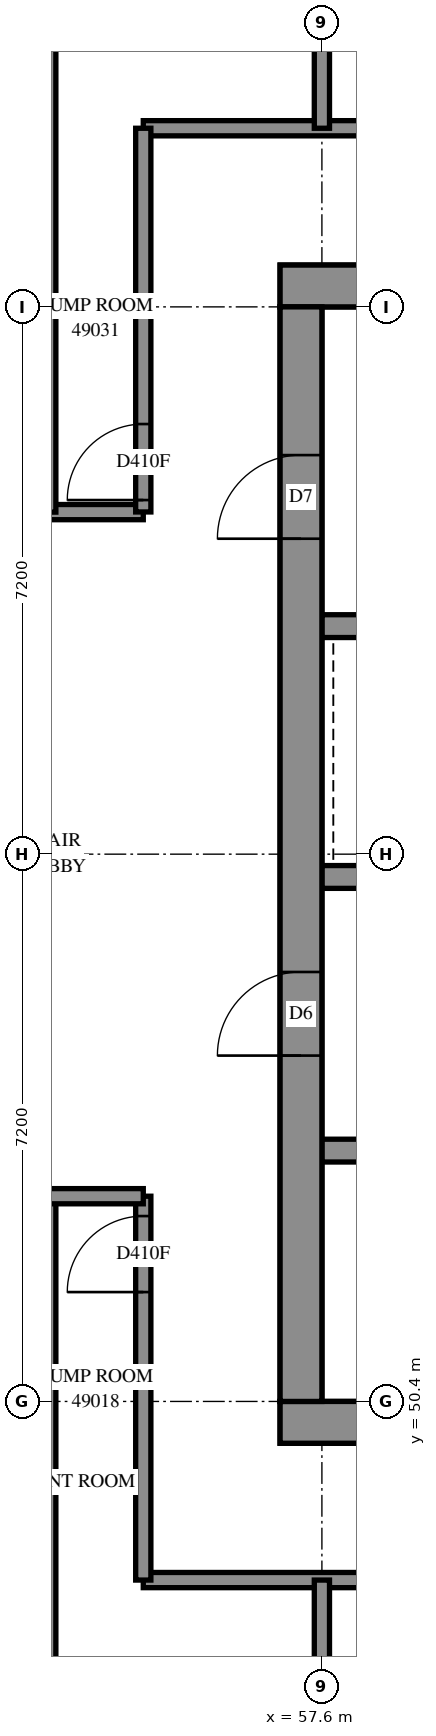
"""IFC4 building model, lengths in metres.
Left out: names, types, materials, properties, quantities, classifications, styles, units other than length and angle.
Written with IfcOpenShell. Run it as: python <this file> out.ifc"""

import sys

from ifc_helpers import new_model, si_unit, direction, frame, frame_2d, origin, place, context, subcontext, project, spatial, rectangle, extrude, element, fill, save


model = new_model("IFC4")
c1 = context("Model", 3, precision=1e-05, world=origin(), true_north=direction((0.0, 1.0)))
c2 = subcontext(c1, "Body", "Model", "MODEL_VIEW")
j1 = project(units=[si_unit("LENGTHUNIT", "METRE"), si_unit("PLANEANGLEUNIT", "RADIAN")], contexts=[c1])
p1 = place(None, origin())
s1 = spatial("IfcSite", under=j1, at=p1, CompositionType="ELEMENT")
p2 = place(p1, origin())
s2 = spatial("IfcBuilding", under=s1, at=p2, CompositionType="ELEMENT")
p3 = place(p2, frame((0.0, 0.0, 180.4)))
s3 = spatial("IfcBuildingStorey", under=s2, at=p3, CompositionType="ELEMENT", Elevation=180.4)
p4 = place(p3, frame((57.05, 50.125, -0.3), z_axis=(0.0, 0.0, 1.0), x_axis=(1.0, 0.0, 0.0)))
e1 = element("IfcWall", 1, at=p4, inside=s3, PredefinedType="SHEAR", context=c2, shape_type="SweptSolid", body=[
    extrude(rectangle(XDim=15.5, YDim=0.55, at=frame_2d((7.75, 0.0))), origin(), (0.0, 0.0, 1.0), 4.3),
])
p5 = place(p3, frame((57.05, 65.075, -0.3), z_axis=(0.0, 0.0, 1.0), x_axis=(1.0, 0.0, 0.0)))
e2 = element("IfcWall", 2, at=p5, inside=s3, PredefinedType="SHEAR", context=c2, shape_type="SweptSolid", body=[
    extrude(rectangle(XDim=15.5, YDim=0.55, at=frame_2d((7.75, 0.0))), origin(), (0.0, 0.0, 1.0), 4.3),
])
p6 = place(p5, frame((10.55, 0.0, 0.3)))
e3 = element("IfcOpeningElement", 3, at=p6, cuts=e2, PredefinedType="OPENING", context=c2, shape_type="SweptSolid", body=[
    extrude(rectangle(XDim=0.8, YDim=2.1, at=frame_2d((0.4, 1.05))), frame((0.0, 0.285, 0.0), z_axis=(0.0, -1.0, 0.0), x_axis=(1.0, 0.0, 0.0)), (0.0, 0.0, 1.0), 0.57),
])
p7 = place(p3, frame((57.325, 50.4, -0.3), z_axis=(0.0, 0.0, 1.0), x_axis=(0.0, 1.0, 0.0)))
e4 = element("IfcWall", 4, at=p7, inside=s3, PredefinedType="SHEAR", context=c2, shape_type="SweptSolid", body=[
    extrude(rectangle(XDim=14.4, YDim=0.55, at=frame_2d((7.2, 0.0))), origin(), (0.0, 0.0, 1.0), 4.3),
])
p8 = place(p7, frame((4.55, 0.0, 0.3)))
e5 = element("IfcOpeningElement", 5, at=p8, cuts=e4, PredefinedType="OPENING", context=c2, shape_type="SweptSolid", body=[
    extrude(rectangle(XDim=1.1, YDim=2.1, at=frame_2d((0.55, 1.05))), frame((0.0, 0.285, 0.0), z_axis=(0.0, -1.0, 0.0), x_axis=(1.0, 0.0, 0.0)), (0.0, 0.0, 1.0), 0.57),
])
p9 = place(p7, frame((11.35, 0.0, 0.3)))
e6 = element("IfcOpeningElement", 6, at=p9, cuts=e4, PredefinedType="OPENING", context=c2, shape_type="SweptSolid", body=[
    extrude(rectangle(XDim=1.1, YDim=2.1, at=frame_2d((0.55, 1.05))), frame((0.0, 0.285, 0.0), z_axis=(0.0, -1.0, 0.0), x_axis=(1.0, 0.0, 0.0)), (0.0, 0.0, 1.0), 0.57),
])
p10 = place(p3, frame((57.6, 53.7, 0.0), z_axis=(0.0, 0.0, 1.0), x_axis=(1.0, 0.0, 0.0)))
e7 = element("IfcWall", 7, at=p10, inside=s3, PredefinedType="SOLIDWALL", context=c2, shape_type="SweptSolid", body=[
    extrude(rectangle(XDim=14.4, YDim=0.3, at=frame_2d((7.2, 0.0))), origin(), (0.0, 0.0, 1.0), 4.7),
])
p11 = place(p10, frame((1.35, 0.0, 0.0)))
e8 = element("IfcOpeningElement", 8, at=p11, cuts=e7, PredefinedType="OPENING", context=c2, shape_type="SweptSolid", body=[
    extrude(rectangle(XDim=0.9, YDim=2.1, at=frame_2d((0.45, 1.05))), frame((0.0, 0.16, 0.0), z_axis=(0.0, -1.0, 0.0), x_axis=(1.0, 0.0, 0.0)), (0.0, 0.0, 1.0), 0.32),
])
p12 = place(p10, frame((4.95, 0.0, 0.0)))
e9 = element("IfcOpeningElement", 9, at=p12, cuts=e7, PredefinedType="OPENING", context=c2, shape_type="SweptSolid", body=[
    extrude(rectangle(XDim=0.9, YDim=2.1, at=frame_2d((0.45, 1.05))), frame((0.0, 0.16, 0.0), z_axis=(0.0, -1.0, 0.0), x_axis=(1.0, 0.0, 0.0)), (0.0, 0.0, 1.0), 0.32),
])
p13 = place(p10, frame((8.55, 0.0, 0.0)))
e10 = element("IfcOpeningElement", 10, at=p13, cuts=e7, PredefinedType="OPENING", context=c2, shape_type="SweptSolid", body=[
    extrude(rectangle(XDim=0.9, YDim=2.1, at=frame_2d((0.45, 1.05))), frame((0.0, 0.16, 0.0), z_axis=(0.0, -1.0, 0.0), x_axis=(1.0, 0.0, 0.0)), (0.0, 0.0, 1.0), 0.32),
])
p14 = place(p10, frame((12.05, 0.0, 0.0)))
e11 = element("IfcOpeningElement", 11, at=p14, cuts=e7, PredefinedType="OPENING", context=c2, shape_type="SweptSolid", body=[
    extrude(rectangle(XDim=1.1, YDim=2.1, at=frame_2d((0.55, 1.05))), frame((0.0, 0.16, 0.0), z_axis=(0.0, -1.0, 0.0), x_axis=(1.0, 0.0, 0.0)), (0.0, 0.0, 1.0), 0.32),
])
p15 = place(p3, frame((57.6, 57.3, 0.0), z_axis=(0.0, 0.0, 1.0), x_axis=(1.0, 0.0, 0.0)))
e12 = element("IfcWall", 12, at=p15, inside=s3, PredefinedType="SOLIDWALL", context=c2, shape_type="SweptSolid", body=[
    extrude(rectangle(XDim=14.4, YDim=0.3, at=frame_2d((7.2, 0.0))), origin(), (0.0, 0.0, 1.0), 4.7),
])
p16 = place(p15, frame((1.25, 0.0, 0.0)))
e13 = element("IfcOpeningElement", 13, at=p16, cuts=e12, PredefinedType="OPENING", context=c2, shape_type="SweptSolid", body=[
    extrude(rectangle(XDim=1.1, YDim=2.1, at=frame_2d((0.55, 1.05))), frame((0.0, 0.16, 0.0), z_axis=(0.0, -1.0, 0.0), x_axis=(1.0, 0.0, 0.0)), (0.0, 0.0, 1.0), 0.32),
])
p17 = place(p15, frame((4.85, 0.0, 0.0)))
e14 = element("IfcOpeningElement", 14, at=p17, cuts=e12, PredefinedType="OPENING", context=c2, shape_type="SweptSolid", body=[
    extrude(rectangle(XDim=1.1, YDim=2.1, at=frame_2d((0.55, 1.05))), frame((0.0, 0.16, 0.0), z_axis=(0.0, -1.0, 0.0), x_axis=(1.0, 0.0, 0.0)), (0.0, 0.0, 1.0), 0.32),
])
p18 = place(p15, frame((8.45, 0.0, 0.0)))
e15 = element("IfcOpeningElement", 15, at=p18, cuts=e12, PredefinedType="OPENING", context=c2, shape_type="SweptSolid", body=[
    extrude(rectangle(XDim=1.1, YDim=2.1, at=frame_2d((0.55, 1.05))), frame((0.0, 0.16, 0.0), z_axis=(0.0, -1.0, 0.0), x_axis=(1.0, 0.0, 0.0)), (0.0, 0.0, 1.0), 0.32),
])
p19 = place(p15, frame((12.05, 0.0, 0.0)))
e16 = element("IfcOpeningElement", 16, at=p19, cuts=e12, PredefinedType="OPENING", context=c2, shape_type="SweptSolid", body=[
    extrude(rectangle(XDim=1.1, YDim=2.1, at=frame_2d((0.55, 1.05))), frame((0.0, 0.16, 0.0), z_axis=(0.0, -1.0, 0.0), x_axis=(1.0, 0.0, 0.0)), (0.0, 0.0, 1.0), 0.32),
])
p20 = place(p3, frame((57.6, 60.6, 0.0), z_axis=(0.0, 0.0, 1.0), x_axis=(1.0, 0.0, 0.0)))
e17 = element("IfcWall", 17, at=p20, inside=s3, PredefinedType="SOLIDWALL", context=c2, shape_type="SweptSolid", body=[
    extrude(rectangle(XDim=7.2, YDim=0.3, at=frame_2d((3.6, 0.0))), origin(), (0.0, 0.0, 1.0), 4.7),
])
p21 = place(p3, frame((55.25, 48.05, 0.0), z_axis=(0.0, 0.0, 1.0), x_axis=(1.0, 0.0, 0.0)))
e18 = element("IfcWall", 18, at=p21, inside=s3, PredefinedType="PARTITIONING", context=c2, shape_type="SweptSolid", body=[
    extrude(rectangle(XDim=19.12, YDim=0.2, at=frame_2d((9.56, 0.0))), origin(), (0.0, 0.0, 1.0), 4.7),
])
p22 = place(p21, frame((4.383, 0.0, 0.0)))
e19 = element("IfcOpeningElement", 19, at=p22, cuts=e18, PredefinedType="OPENING", context=c2, shape_type="SweptSolid", body=[
    extrude(rectangle(XDim=1.0, YDim=2.1, at=frame_2d((0.5, 1.05))), frame((0.0, 0.11, 0.0), z_axis=(0.0, -1.0, 0.0), x_axis=(1.0, 0.0, 0.0)), (0.0, 0.0, 1.0), 0.22),
])
p23 = place(p21, frame((6.457, 0.0, 0.0)))
e20 = element("IfcOpeningElement", 20, at=p23, cuts=e18, PredefinedType="OPENING", context=c2, shape_type="SweptSolid", body=[
    extrude(rectangle(XDim=1.0, YDim=2.1, at=frame_2d((0.5, 1.05))), frame((0.0, 0.11, 0.0), z_axis=(0.0, -1.0, 0.0), x_axis=(1.0, 0.0, 0.0)), (0.0, 0.0, 1.0), 0.22),
])
p24 = place(p21, frame((11.582, 0.0, 0.0)))
e21 = element("IfcOpeningElement", 21, at=p24, cuts=e18, PredefinedType="OPENING", context=c2, shape_type="SweptSolid", body=[
    extrude(rectangle(XDim=1.0, YDim=2.1, at=frame_2d((0.5, 1.05))), frame((0.0, 0.11, 0.0), z_axis=(0.0, -1.0, 0.0), x_axis=(1.0, 0.0, 0.0)), (0.0, 0.0, 1.0), 0.22),
])
p25 = place(p21, frame((13.658, 0.0, 0.0)))
e22 = element("IfcOpeningElement", 22, at=p25, cuts=e18, PredefinedType="OPENING", context=c2, shape_type="SweptSolid", body=[
    extrude(rectangle(XDim=1.0, YDim=2.1, at=frame_2d((0.5, 1.05))), frame((0.0, 0.11, 0.0), z_axis=(0.0, -1.0, 0.0), x_axis=(1.0, 0.0, 0.0)), (0.0, 0.0, 1.0), 0.22),
])
p26 = place(p3, frame((55.25, 67.15, 0.0), z_axis=(0.0, 0.0, 1.0), x_axis=(1.0, 0.0, 0.0)))
e23 = element("IfcWall", 23, at=p26, inside=s3, PredefinedType="PARTITIONING", context=c2, shape_type="SweptSolid", body=[
    extrude(rectangle(XDim=19.1, YDim=0.2, at=frame_2d((9.55, 0.0))), origin(), (0.0, 0.0, 1.0), 4.7),
])
p27 = place(p26, frame((4.442, 0.0, 0.0)))
e24 = element("IfcOpeningElement", 24, at=p27, cuts=e23, PredefinedType="OPENING", context=c2, shape_type="SweptSolid", body=[
    extrude(rectangle(XDim=1.0, YDim=2.1, at=frame_2d((0.5, 1.05))), frame((0.0, 0.11, 0.0), z_axis=(0.0, -1.0, 0.0), x_axis=(1.0, 0.0, 0.0)), (0.0, 0.0, 1.0), 0.22),
])
p28 = place(p26, frame((6.518, 0.0, 0.0)))
e25 = element("IfcOpeningElement", 25, at=p28, cuts=e23, PredefinedType="OPENING", context=c2, shape_type="SweptSolid", body=[
    extrude(rectangle(XDim=1.0, YDim=2.1, at=frame_2d((0.5, 1.05))), frame((0.0, 0.11, 0.0), z_axis=(0.0, -1.0, 0.0), x_axis=(1.0, 0.0, 0.0)), (0.0, 0.0, 1.0), 0.22),
])
p29 = place(p26, frame((11.643, 0.0, 0.0)))
e26 = element("IfcOpeningElement", 26, at=p29, cuts=e23, PredefinedType="OPENING", context=c2, shape_type="SweptSolid", body=[
    extrude(rectangle(XDim=1.0, YDim=2.1, at=frame_2d((0.5, 1.05))), frame((0.0, 0.11, 0.0), z_axis=(0.0, -1.0, 0.0), x_axis=(1.0, 0.0, 0.0)), (0.0, 0.0, 1.0), 0.22),
])
p30 = place(p26, frame((13.717, 0.0, 0.0)))
e27 = element("IfcOpeningElement", 27, at=p30, cuts=e23, PredefinedType="OPENING", context=c2, shape_type="SweptSolid", body=[
    extrude(rectangle(XDim=1.0, YDim=2.1, at=frame_2d((0.5, 1.05))), frame((0.0, 0.11, 0.0), z_axis=(0.0, -1.0, 0.0), x_axis=(1.0, 0.0, 0.0)), (0.0, 0.0, 1.0), 0.22),
])
p31 = place(p3, frame((40.502, 62.1, 0.0), z_axis=(0.0, 0.0, 1.0), x_axis=(1.0, 0.0, 0.0)))
e28 = element("IfcWall", 28, at=p31, inside=s3, PredefinedType="PARTITIONING", context=c2, shape_type="SweptSolid", body=[
    extrude(rectangle(XDim=14.748, YDim=0.2, at=frame_2d((7.374, 0.0))), origin(), (0.0, 0.0, 1.0), 4.7),
])
p32 = place(p31, frame((0.265, 0.0, 0.0)))
e29 = element("IfcOpeningElement", 29, at=p32, cuts=e28, PredefinedType="OPENING", context=c2, shape_type="SweptSolid", body=[
    extrude(rectangle(XDim=1.0, YDim=2.1, at=frame_2d((0.5, 1.05))), frame((0.0, 0.11, 0.0), z_axis=(0.0, -1.0, 0.0), x_axis=(1.0, 0.0, 0.0)), (0.0, 0.0, 1.0), 0.22),
])
p33 = place(p31, frame((6.561, 0.0, 0.0)))
e30 = element("IfcOpeningElement", 30, at=p33, cuts=e28, PredefinedType="OPENING", context=c2, shape_type="SweptSolid", body=[
    extrude(rectangle(XDim=1.0, YDim=2.1, at=frame_2d((0.5, 1.05))), frame((0.0, 0.11, 0.0), z_axis=(0.0, -1.0, 0.0), x_axis=(1.0, 0.0, 0.0)), (0.0, 0.0, 1.0), 0.22),
])
p34 = place(p31, frame((11.991, 0.0, 0.0)))
e31 = element("IfcOpeningElement", 31, at=p34, cuts=e28, PredefinedType="OPENING", context=c2, shape_type="SweptSolid", body=[
    extrude(rectangle(XDim=1.0, YDim=2.1, at=frame_2d((0.5, 1.05))), frame((0.0, 0.11, 0.0), z_axis=(0.0, -1.0, 0.0), x_axis=(1.0, 0.0, 0.0)), (0.0, 0.0, 1.0), 0.22),
])
for number, where, z_axis, x_axis in (
    (32, (54.0, 45.55, 0.0), (0.0, 0.0, 1.0), (0.0, 1.0, 0.0)),
    (33, (54.0, 62.1, 0.0), (0.0, 0.0, 1.0), (0.0, 1.0, 0.0)),
):
    element("IfcWall", number, at=place(p3, frame(where, z_axis=z_axis, x_axis=x_axis)), inside=s3, PredefinedType="PARTITIONING", context=c2, shape_type="SweptSolid", body=[
        extrude(rectangle(XDim=7.55, YDim=0.2, at=frame_2d((3.775, 0.0))), origin(), (0.0, 0.0, 1.0), 4.7),
    ])
p35 = place(p3, frame((55.25, 48.05, 0.0), z_axis=(0.0, 0.0, 1.0), x_axis=(0.0, 1.0, 0.0)))
e34 = element("IfcWall", 34, at=p35, inside=s3, PredefinedType="PARTITIONING", context=c2, shape_type="SweptSolid", body=[
    extrude(rectangle(XDim=5.05, YDim=0.2, at=frame_2d((2.525, 0.0))), origin(), (0.0, 0.0, 1.0), 4.7),
])
p36 = place(p35, frame((3.789, 0.0, 0.0)))
e35 = element("IfcOpeningElement", 35, at=p36, cuts=e34, PredefinedType="OPENING", context=c2, shape_type="SweptSolid", body=[
    extrude(rectangle(XDim=1.0, YDim=2.1, at=frame_2d((0.5, 1.05))), frame((0.0, 0.11, 0.0), z_axis=(0.0, -1.0, 0.0), x_axis=(1.0, 0.0, 0.0)), (0.0, 0.0, 1.0), 0.22),
])
p37 = place(p3, frame((55.25, 62.102, 0.0), z_axis=(0.0, 0.0, 1.0), x_axis=(0.0, 1.0, 0.0)))
e36 = element("IfcWall", 36, at=p37, inside=s3, PredefinedType="PARTITIONING", context=c2, shape_type="SweptSolid", body=[
    extrude(rectangle(XDim=5.048, YDim=0.2, at=frame_2d((2.524, 0.0))), origin(), (0.0, 0.0, 1.0), 4.7),
])
p38 = place(p37, frame((0.157, 0.0, 0.0)))
e37 = element("IfcOpeningElement", 37, at=p38, cuts=e36, PredefinedType="OPENING", context=c2, shape_type="SweptSolid", body=[
    extrude(rectangle(XDim=1.0, YDim=2.1, at=frame_2d((0.5, 1.05))), frame((0.0, 0.11, 0.0), z_axis=(0.0, -1.0, 0.0), x_axis=(1.0, 0.0, 0.0)), (0.0, 0.0, 1.0), 0.22),
])
p39 = place(p3, frame((50.4, 53.1, 0.0), z_axis=(0.0, 0.0, 1.0), x_axis=(1.0, 0.0, 0.0)))
e38 = element("IfcWall", 38, at=p39, inside=s3, PredefinedType="PARTITIONING", context=c2, shape_type="SweptSolid", body=[
    extrude(rectangle(XDim=4.85, YDim=0.2, at=frame_2d((2.425, 0.0))), origin(), (0.0, 0.0, 1.0), 4.7),
])
p40 = place(p39, frame((2.033, 0.0, 0.0)))
e39 = element("IfcOpeningElement", 39, at=p40, cuts=e38, PredefinedType="OPENING", context=c2, shape_type="SweptSolid", body=[
    extrude(rectangle(XDim=1.0, YDim=2.1, at=frame_2d((0.5, 1.05))), frame((0.0, 0.11, 0.0), z_axis=(0.0, -1.0, 0.0), x_axis=(1.0, 0.0, 0.0)), (0.0, 0.0, 1.0), 0.22),
])
for number, where, z_axis, x_axis in (
    (40, (57.6, 45.55, 0.0), (0.0, 0.0, 1.0), (0.0, 1.0, 0.0)),
    (41, (57.6, 67.15, 0.0), (0.0, 0.0, 1.0), (0.0, 1.0, 0.0)),
):
    element("IfcWall", number, at=place(p3, frame(where, z_axis=z_axis, x_axis=x_axis)), inside=s3, PredefinedType="PARTITIONING", context=c2, shape_type="SweptSolid", body=[
        extrude(rectangle(XDim=2.5, YDim=0.2, at=frame_2d((1.25, 0.0))), origin(), (0.0, 0.0, 1.0), 4.7),
    ])
p41 = place(p8, origin())
e42 = element("IfcDoor", 42, at=p41, inside=s3, OperationType="DOUBLE_DOOR_SINGLE_SWING", PredefinedType="DOOR", context=c2, shape_type="SweptSolid", body=[
    extrude(rectangle(XDim=1.1, YDim=2.1, at=frame_2d((0.55, 1.05))), frame((0.0, 0.025, 0.0), z_axis=(0.0, -1.0, 0.0), x_axis=(1.0, 0.0, 0.0)), (0.0, 0.0, 1.0), 0.05),
])
fill(e5, e42)
p42 = place(p9, origin())
e43 = element("IfcDoor", 43, at=p42, inside=s3, OperationType="SINGLE_SWING_LEFT", PredefinedType="DOOR", context=c2, shape_type="SweptSolid", body=[
    extrude(rectangle(XDim=1.1, YDim=2.1, at=frame_2d((0.55, 1.05))), frame((0.0, 0.025, 0.0), z_axis=(0.0, -1.0, 0.0), x_axis=(1.0, 0.0, 0.0)), (0.0, 0.0, 1.0), 0.05),
])
fill(e6, e43)
p43 = place(p36, origin())
e44 = element("IfcDoor", 44, at=p43, inside=s3, OperationType="SINGLE_SWING_RIGHT", PredefinedType="DOOR", context=c2, shape_type="SweptSolid", body=[
    extrude(rectangle(XDim=1.0, YDim=2.1, at=frame_2d((0.5, 1.05))), frame((0.0, 0.025, 0.0), z_axis=(0.0, -1.0, 0.0), x_axis=(1.0, 0.0, 0.0)), (0.0, 0.0, 1.0), 0.05),
])
fill(e35, e44)
p44 = place(p38, origin())
e45 = element("IfcDoor", 45, at=p44, inside=s3, OperationType="SINGLE_SWING_LEFT", PredefinedType="DOOR", context=c2, shape_type="SweptSolid", body=[
    extrude(rectangle(XDim=1.0, YDim=2.1, at=frame_2d((0.5, 1.05))), frame((0.0, 0.025, 0.0), z_axis=(0.0, -1.0, 0.0), x_axis=(1.0, 0.0, 0.0)), (0.0, 0.0, 1.0), 0.05),
])
fill(e37, e45)
save(model, sys.argv[1])
